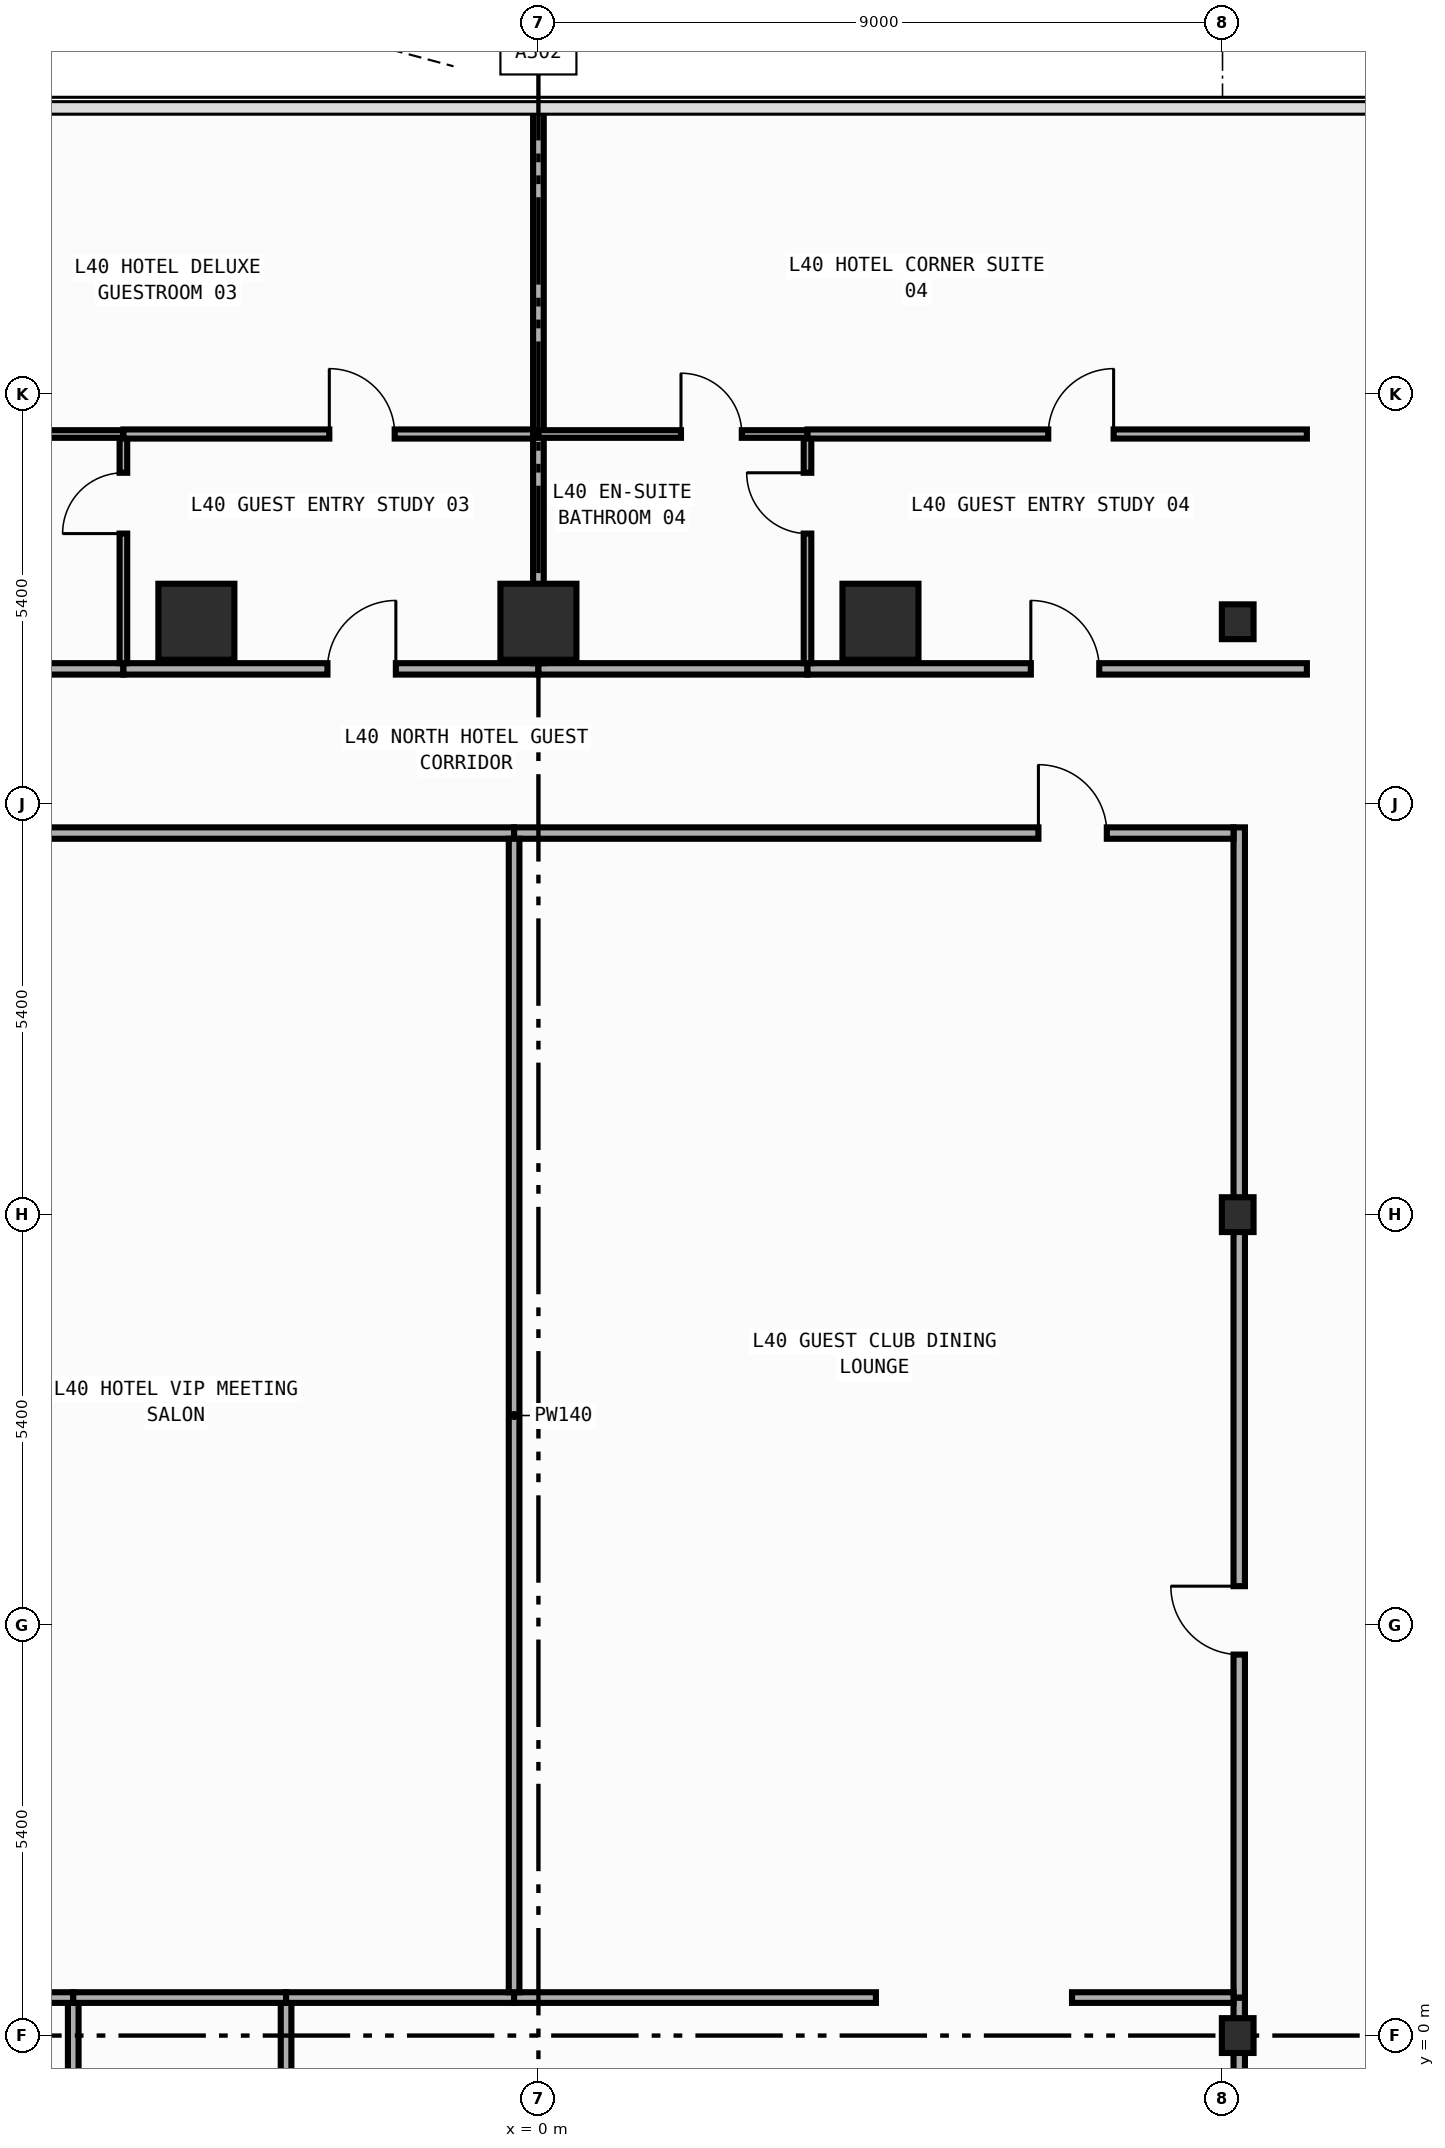
"""IFC4 building model, lengths in metres.
Left out: names, types, materials, properties, quantities, classifications, styles, units other than length and angle.
Written with IfcOpenShell. Run it as: python <this file> out.ifc"""

import sys

from ifc_helpers import new_model, si_unit, direction, frame, frame_2d, origin, origin_2d, place, context, subcontext, project, spatial, rectangle, i_section, extrude, element, fill, save


model = new_model("IFC4")
c1 = context("Model", 3, precision=1e-05, world=origin(), true_north=direction((0.0, 1.0)))
c2 = subcontext(c1, "Body", "Model", "MODEL_VIEW")
j1 = project(units=[si_unit("LENGTHUNIT", "METRE"), si_unit("PLANEANGLEUNIT", "RADIAN")], contexts=[c1])
p1 = place(None, origin())
s1 = spatial("IfcSite", under=j1, at=p1, CompositionType="ELEMENT")
p2 = place(p1, origin())
s2 = spatial("IfcBuilding", under=s1, at=p2, CompositionType="ELEMENT")
p3 = place(p2, frame((0.0, 0.0, 176.4)))
s3 = spatial("IfcBuildingStorey", under=s2, at=p3, CompositionType="ELEMENT", Elevation=176.4)
for number, where, z_axis, x_axis in (
    (1, (9.2, 0.0, 0.0), (0.0, 0.0, 1.0), (1.0, 0.0, 0.0)),
    (2, (9.2, 10.8, 0.0), (0.0, 0.0, 1.0), (1.0, 0.0, 0.0)),
    (3, (9.2, 18.6, 0.0), (0.0, 0.0, 1.0), (1.0, 0.0, 0.0)),
):
    element("IfcColumn", number, at=place(p3, frame(where, z_axis=z_axis, x_axis=x_axis)), inside=s3, PredefinedType="COLUMN", context=c2, shape_type="SweptSolid", body=[
        extrude(i_section(OverallWidth=0.417, OverallDepth=0.458, WebThickness=0.03, FlangeThickness=0.05, FilletRadius=0.022, at=origin_2d()), origin(), (0.0, 0.0, 1.0), 3.8),
    ])
for number, where, z_axis, x_axis in (
    (4, (-4.5, 18.6, 0.0), (0.0, 0.0, 1.0), (1.0, 0.0, 0.0)),
    (5, (0.0, 18.6, 0.0), (0.0, 0.0, 1.0), (1.0, 0.0, 0.0)),
    (6, (4.5, 18.6, 0.0), (0.0, 0.0, 1.0), (1.0, 0.0, 0.0)),
):
    element("IfcColumn", number, at=place(p3, frame(where, z_axis=z_axis, x_axis=x_axis)), inside=s3, PredefinedType="COLUMN", context=c2, shape_type="SweptSolid", body=[
        extrude(rectangle(XDim=1.0, YDim=1.0, at=origin_2d()), origin(), (0.0, 0.0, 1.0), 3.8),
    ])
p4 = place(p3, frame((9.22, -14.595, 0.0), z_axis=(0.0, 0.0, 1.0), x_axis=(0.0, 1.0, 0.0)))
e7 = element("IfcWall", 7, at=p4, inside=s3, PredefinedType="PARTITIONING", context=c2, shape_type="SweptSolid", body=[
    extrude(rectangle(XDim=15.095, YDim=0.15, at=frame_2d((7.547, 0.0))), origin(), (0.0, 0.0, 1.0), 2.952),
])
p5 = place(p4, frame((8.707, 0.0, 0.0)))
e8 = element("IfcOpeningElement", 8, at=p5, cuts=e7, PredefinedType="OPENING", context=c2, shape_type="SweptSolid", body=[
    extrude(rectangle(XDim=0.9, YDim=2.15, at=frame_2d((0.45, 1.075))), frame((0.0, 0.085, 0.0), z_axis=(0.0, -1.0, 0.0), x_axis=(1.0, 0.0, 0.0)), (0.0, 0.0, 1.0), 0.17),
])
p6 = place(p3, frame((9.22, 0.5, 0.0), z_axis=(0.0, 0.0, 1.0), x_axis=(0.0, 1.0, 0.0)))
e9 = element("IfcWall", 9, at=p6, inside=s3, PredefinedType="PARTITIONING", context=c2, shape_type="SweptSolid", body=[
    extrude(rectangle(XDim=15.395, YDim=0.15, at=frame_2d((7.698, 0.0))), origin(), (0.0, 0.0, 1.0), 2.952),
])
p7 = place(p6, frame((4.512, 0.0, 0.0)))
e10 = element("IfcOpeningElement", 10, at=p7, cuts=e9, PredefinedType="OPENING", context=c2, shape_type="SweptSolid", body=[
    extrude(rectangle(XDim=0.9, YDim=2.15, at=frame_2d((0.45, 1.075))), frame((0.0, 0.085, 0.0), z_axis=(0.0, -1.0, 0.0), x_axis=(1.0, 0.0, 0.0)), (0.0, 0.0, 1.0), 0.17),
])
p8 = place(p3, frame((-9.145, 15.82, 0.0), z_axis=(0.0, 0.0, 1.0), x_axis=(1.0, 0.0, 0.0)))
e11 = element("IfcWall", 11, at=p8, inside=s3, PredefinedType="PARTITIONING", context=c2, shape_type="SweptSolid", body=[
    extrude(rectangle(XDim=8.825, YDim=0.15, at=frame_2d((4.413, 0.0))), origin(), (0.0, 0.0, 1.0), 3.54),
])
p9 = place(p8, frame((1.661, 0.0, 0.0)))
e12 = element("IfcOpeningElement", 12, at=p9, cuts=e11, PredefinedType="OPENING", context=c2, shape_type="SweptSolid", body=[
    extrude(rectangle(XDim=0.9, YDim=2.15, at=frame_2d((0.45, 1.075))), frame((0.0, 0.085, 0.0), z_axis=(0.0, -1.0, 0.0), x_axis=(1.0, 0.0, 0.0)), (0.0, 0.0, 1.0), 0.17),
])
p10 = place(p3, frame((-0.32, 15.82, 0.0), z_axis=(0.0, 0.0, 1.0), x_axis=(1.0, 0.0, 0.0)))
e13 = element("IfcWall", 13, at=p10, inside=s3, PredefinedType="PARTITIONING", context=c2, shape_type="SweptSolid", body=[
    extrude(rectangle(XDim=9.465, YDim=0.15, at=frame_2d((4.732, 0.0))), origin(), (0.0, 0.0, 1.0), 3.54),
])
p11 = place(p10, frame((6.898, 0.0, 0.0)))
e14 = element("IfcOpeningElement", 14, at=p11, cuts=e13, PredefinedType="OPENING", context=c2, shape_type="SweptSolid", body=[
    extrude(rectangle(XDim=0.9, YDim=2.15, at=frame_2d((0.45, 1.075))), frame((0.0, 0.085, 0.0), z_axis=(0.0, -1.0, 0.0), x_axis=(1.0, 0.0, 0.0)), (0.0, 0.0, 1.0), 0.17),
])
p12 = place(p3, frame((-9.0, 17.98, 0.0), z_axis=(0.0, 0.0, 1.0), x_axis=(1.0, 0.0, 0.0)))
e15 = element("IfcWall", 15, at=p12, inside=s3, PredefinedType="PARTITIONING", context=c2, shape_type="SweptSolid", body=[
    extrude(rectangle(XDim=3.54, YDim=0.15, at=frame_2d((1.77, 0.0))), origin(), (0.0, 0.0, 1.0), 3.54),
])
p13 = place(p3, frame((-5.46, 17.98, 0.0), z_axis=(0.0, 0.0, 1.0), x_axis=(1.0, 0.0, 0.0)))
e16 = element("IfcWall", 16, at=p13, inside=s3, PredefinedType="PARTITIONING", context=c2, shape_type="SweptSolid", body=[
    extrude(rectangle(XDim=5.46, YDim=0.15, at=frame_2d((2.73, 0.0))), origin(), (0.0, 0.0, 1.0), 3.54),
])
p14 = place(p13, frame((2.684, 0.0, 0.0)))
e17 = element("IfcOpeningElement", 17, at=p14, cuts=e16, PredefinedType="OPENING", context=c2, shape_type="SweptSolid", body=[
    extrude(rectangle(XDim=0.9, YDim=2.15, at=frame_2d((0.45, 1.075))), frame((0.0, 0.085, 0.0), z_axis=(0.0, -1.0, 0.0), x_axis=(1.0, 0.0, 0.0)), (0.0, 0.0, 1.0), 0.17),
])
p15 = place(p3, frame((0.0, 17.98, 0.0), z_axis=(0.0, 0.0, 1.0), x_axis=(1.0, 0.0, 0.0)))
e18 = element("IfcWall", 18, at=p15, inside=s3, PredefinedType="PARTITIONING", context=c2, shape_type="SweptSolid", body=[
    extrude(rectangle(XDim=3.54, YDim=0.15, at=frame_2d((1.77, 0.0))), origin(), (0.0, 0.0, 1.0), 3.54),
])
p16 = place(p3, frame((3.54, 17.98, 0.0), z_axis=(0.0, 0.0, 1.0), x_axis=(1.0, 0.0, 0.0)))
e19 = element("IfcWall", 19, at=p16, inside=s3, PredefinedType="PARTITIONING", context=c2, shape_type="SweptSolid", body=[
    extrude(rectangle(XDim=6.57, YDim=0.15, at=frame_2d((3.285, 0.0))), origin(), (0.0, 0.0, 1.0), 3.54),
])
p17 = place(p16, frame((2.938, 0.0, 0.0)))
e20 = element("IfcOpeningElement", 20, at=p17, cuts=e19, PredefinedType="OPENING", context=c2, shape_type="SweptSolid", body=[
    extrude(rectangle(XDim=0.9, YDim=2.15, at=frame_2d((0.45, 1.075))), frame((0.0, 0.085, 0.0), z_axis=(0.0, -1.0, 0.0), x_axis=(1.0, 0.0, 0.0)), (0.0, 0.0, 1.0), 0.17),
])
p18 = place(p3, frame((-6.12, -14.445, 0.0), z_axis=(0.0, 0.0, 1.0), x_axis=(0.0, 1.0, 0.0)))
e21 = element("IfcWall", 21, at=p18, inside=s3, PredefinedType="PARTITIONING", context=c2, shape_type="SweptSolid", body=[
    extrude(rectangle(XDim=14.875, YDim=0.14, at=frame_2d((7.438, 0.0))), origin(), (0.0, 0.0, 1.0), 3.54),
])
p19 = place(p3, frame((-9.145, 0.5, 0.0), z_axis=(0.0, 0.0, 1.0), x_axis=(1.0, 0.0, 0.0)))
e22 = element("IfcWall", 22, at=p19, inside=s3, PredefinedType="PARTITIONING", context=c2, shape_type="SweptSolid", body=[
    extrude(rectangle(XDim=3.025, YDim=0.14, at=frame_2d((1.512, 0.0))), origin(), (0.0, 0.0, 1.0), 3.54),
])
p20 = place(p3, frame((-3.32, -14.445, 0.0), z_axis=(0.0, 0.0, 1.0), x_axis=(0.0, 1.0, 0.0)))
e23 = element("IfcWall", 23, at=p20, inside=s3, PredefinedType="PARTITIONING", context=c2, shape_type="SweptSolid", body=[
    extrude(rectangle(XDim=14.875, YDim=0.14, at=frame_2d((7.438, 0.0))), origin(), (0.0, 0.0, 1.0), 3.54),
])
p21 = place(p3, frame((-6.12, 0.5, 0.0), z_axis=(0.0, 0.0, 1.0), x_axis=(1.0, 0.0, 0.0)))
e24 = element("IfcWall", 24, at=p21, inside=s3, PredefinedType="PARTITIONING", context=c2, shape_type="SweptSolid", body=[
    extrude(rectangle(XDim=2.8, YDim=0.14, at=frame_2d((1.4, 0.0))), origin(), (0.0, 0.0, 1.0), 3.54),
])
p22 = place(p3, frame((-3.32, 0.5, 0.0), z_axis=(0.0, 0.0, 1.0), x_axis=(1.0, 0.0, 0.0)))
e25 = element("IfcWall", 25, at=p22, inside=s3, PredefinedType="PARTITIONING", context=c2, shape_type="SweptSolid", body=[
    extrude(rectangle(XDim=3.0, YDim=0.14, at=frame_2d((1.5, 0.0))), origin(), (0.0, 0.0, 1.0), 3.54),
])
p23 = place(p3, frame((-0.32, 0.5, 0.0), z_axis=(0.0, 0.0, 1.0), x_axis=(1.0, 0.0, 0.0)))
e26 = element("IfcWall", 26, at=p23, inside=s3, PredefinedType="PARTITIONING", context=c2, shape_type="SweptSolid", body=[
    extrude(rectangle(XDim=4.76, YDim=0.14, at=frame_2d((2.38, 0.0))), origin(), (0.0, 0.0, 1.0), 3.54),
])
p24 = place(p3, frame((7.02, 0.5, 0.0), z_axis=(0.0, 0.0, 1.0), x_axis=(1.0, 0.0, 0.0)))
e27 = element("IfcWall", 27, at=p24, inside=s3, PredefinedType="PARTITIONING", context=c2, shape_type="SweptSolid", body=[
    extrude(rectangle(XDim=2.125, YDim=0.14, at=frame_2d((1.062, 0.0))), origin(), (0.0, 0.0, 1.0), 3.54),
])
p25 = place(p3, frame((-0.32, 0.57, 0.0), z_axis=(0.0, 0.0, 1.0), x_axis=(0.0, 1.0, 0.0)))
e28 = element("IfcWall", 28, at=p25, inside=s3, PredefinedType="PARTITIONING", context=c2, shape_type="SweptSolid", body=[
    extrude(rectangle(XDim=15.175, YDim=0.14, at=frame_2d((7.587, 0.0))), origin(), (0.0, 0.0, 1.0), 3.54),
])
p26 = place(p3, frame((-5.46, 18.055, 0.0), z_axis=(0.0, 0.0, 1.0), x_axis=(0.0, 1.0, 0.0)))
e29 = element("IfcWall", 29, at=p26, inside=s3, PredefinedType="PARTITIONING", context=c2, shape_type="SweptSolid", body=[
    extrude(rectangle(XDim=2.965, YDim=0.1, at=frame_2d((1.482, 0.0))), origin(), (0.0, 0.0, 1.0), 3.54),
])
p27 = place(p26, frame((1.705, 0.0, 0.0)))
e30 = element("IfcOpeningElement", 30, at=p27, cuts=e29, PredefinedType="OPENING", context=c2, shape_type="SweptSolid", body=[
    extrude(rectangle(XDim=0.8, YDim=2.1, at=frame_2d((0.4, 1.05))), frame((0.0, 0.06, 0.0), z_axis=(0.0, -1.0, 0.0), x_axis=(1.0, 0.0, 0.0)), (0.0, 0.0, 1.0), 0.12),
])
p28 = place(p3, frame((-9.0, 21.07, 0.0), z_axis=(0.0, 0.0, 1.0), x_axis=(1.0, 0.0, 0.0)))
e31 = element("IfcWall", 31, at=p28, inside=s3, PredefinedType="PARTITIONING", context=c2, shape_type="SweptSolid", body=[
    extrude(rectangle(XDim=3.54, YDim=0.1, at=frame_2d((1.77, 0.0))), origin(), (0.0, 0.0, 1.0), 3.54),
])
p29 = place(p28, frame((1.471, 0.0, 0.0)))
e32 = element("IfcOpeningElement", 32, at=p29, cuts=e31, PredefinedType="OPENING", context=c2, shape_type="SweptSolid", body=[
    extrude(rectangle(XDim=0.8, YDim=2.1, at=frame_2d((0.4, 1.05))), frame((0.0, 0.06, 0.0), z_axis=(0.0, -1.0, 0.0), x_axis=(1.0, 0.0, 0.0)), (0.0, 0.0, 1.0), 0.12),
])
p30 = place(p3, frame((-5.46, 21.07, 0.0), z_axis=(0.0, 0.0, 1.0), x_axis=(1.0, 0.0, 0.0)))
e33 = element("IfcWall", 33, at=p30, inside=s3, PredefinedType="PARTITIONING", context=c2, shape_type="SweptSolid", body=[
    extrude(rectangle(XDim=5.46, YDim=0.12, at=frame_2d((2.73, 0.0))), origin(), (0.0, 0.0, 1.0), 3.54),
])
p31 = place(p30, frame((2.709, 0.0, 0.0)))
e34 = element("IfcOpeningElement", 34, at=p31, cuts=e33, PredefinedType="OPENING", context=c2, shape_type="SweptSolid", body=[
    extrude(rectangle(XDim=0.86, YDim=2.15, at=frame_2d((0.43, 1.075))), frame((0.0, 0.07, 0.0), z_axis=(0.0, -1.0, 0.0), x_axis=(1.0, 0.0, 0.0)), (0.0, 0.0, 1.0), 0.14),
])
p32 = place(p3, frame((0.0, 18.055, 0.0), z_axis=(0.0, 0.0, 1.0), x_axis=(0.0, 1.0, 0.0)))
e35 = element("IfcWall", 35, at=p32, inside=s3, PredefinedType="PARTITIONING", context=c2, shape_type="SweptSolid", body=[
    extrude(rectangle(XDim=3.015, YDim=0.14, at=frame_2d((1.508, 0.0))), origin(), (0.0, 0.0, 1.0), 3.54),
])
p33 = place(p3, frame((0.0, 21.07, 0.0), z_axis=(0.0, 0.0, 1.0), x_axis=(0.0, 1.0, 0.0)))
e36 = element("IfcWall", 36, at=p33, inside=s3, PredefinedType="PARTITIONING", context=c2, shape_type="SweptSolid", body=[
    extrude(rectangle(XDim=4.285, YDim=0.14, at=frame_2d((2.143, 0.0))), origin(), (0.0, 0.0, 1.0), 3.54),
])
p34 = place(p3, frame((3.54, 18.055, 0.0), z_axis=(0.0, 0.0, 1.0), x_axis=(0.0, 1.0, 0.0)))
e37 = element("IfcWall", 37, at=p34, inside=s3, PredefinedType="PARTITIONING", context=c2, shape_type="SweptSolid", body=[
    extrude(rectangle(XDim=2.965, YDim=0.1, at=frame_2d((1.482, 0.0))), origin(), (0.0, 0.0, 1.0), 3.54),
])
p35 = place(p34, frame((1.705, 0.0, 0.0)))
e38 = element("IfcOpeningElement", 38, at=p35, cuts=e37, PredefinedType="OPENING", context=c2, shape_type="SweptSolid", body=[
    extrude(rectangle(XDim=0.8, YDim=2.1, at=frame_2d((0.4, 1.05))), frame((0.0, 0.06, 0.0), z_axis=(0.0, -1.0, 0.0), x_axis=(1.0, 0.0, 0.0)), (0.0, 0.0, 1.0), 0.12),
])
p36 = place(p3, frame((0.0, 21.07, 0.0), z_axis=(0.0, 0.0, 1.0), x_axis=(1.0, 0.0, 0.0)))
e39 = element("IfcWall", 39, at=p36, inside=s3, PredefinedType="PARTITIONING", context=c2, shape_type="SweptSolid", body=[
    extrude(rectangle(XDim=3.54, YDim=0.1, at=frame_2d((1.77, 0.0))), origin(), (0.0, 0.0, 1.0), 3.54),
])
p37 = place(p36, frame((1.875, 0.0, 0.0)))
e40 = element("IfcOpeningElement", 40, at=p37, cuts=e39, PredefinedType="OPENING", context=c2, shape_type="SweptSolid", body=[
    extrude(rectangle(XDim=0.8, YDim=2.1, at=frame_2d((0.4, 1.05))), frame((0.0, 0.06, 0.0), z_axis=(0.0, -1.0, 0.0), x_axis=(1.0, 0.0, 0.0)), (0.0, 0.0, 1.0), 0.12),
])
p38 = place(p3, frame((3.54, 21.07, 0.0), z_axis=(0.0, 0.0, 1.0), x_axis=(1.0, 0.0, 0.0)))
e41 = element("IfcWall", 41, at=p38, inside=s3, PredefinedType="PARTITIONING", context=c2, shape_type="SweptSolid", body=[
    extrude(rectangle(XDim=6.57, YDim=0.12, at=frame_2d((3.285, 0.0))), origin(), (0.0, 0.0, 1.0), 3.54),
])
p39 = place(p38, frame((3.167, 0.0, 0.0)))
e42 = element("IfcOpeningElement", 42, at=p39, cuts=e41, PredefinedType="OPENING", context=c2, shape_type="SweptSolid", body=[
    extrude(rectangle(XDim=0.86, YDim=2.15, at=frame_2d((0.43, 1.075))), frame((0.0, 0.07, 0.0), z_axis=(0.0, -1.0, 0.0), x_axis=(1.0, 0.0, 0.0)), (0.0, 0.0, 1.0), 0.14),
])
p40 = place(p7, origin())
e43 = element("IfcDoor", 43, at=p40, inside=s3, OperationType="SINGLE_SWING_RIGHT", PredefinedType="DOOR", context=c2, shape_type="SweptSolid", body=[
    extrude(rectangle(XDim=0.9, YDim=2.15, at=frame_2d((0.45, 1.075))), frame((0.0, 0.025, 0.0), z_axis=(0.0, -1.0, 0.0), x_axis=(1.0, 0.0, 0.0)), (0.0, 0.0, 1.0), 0.05),
])
fill(e10, e43)
p41 = place(p11, origin())
e44 = element("IfcDoor", 44, at=p41, inside=s3, OperationType="SINGLE_SWING_LEFT", PredefinedType="DOOR", context=c2, shape_type="SweptSolid", body=[
    extrude(rectangle(XDim=0.9, YDim=2.15, at=frame_2d((0.45, 1.075))), frame((0.0, 0.025, 0.0), z_axis=(0.0, -1.0, 0.0), x_axis=(1.0, 0.0, 0.0)), (0.0, 0.0, 1.0), 0.05),
])
fill(e14, e44)
p42 = place(p14, origin())
e45 = element("IfcDoor", 45, at=p42, inside=s3, OperationType="SINGLE_SWING_RIGHT", PredefinedType="DOOR", context=c2, shape_type="SweptSolid", body=[
    extrude(rectangle(XDim=0.9, YDim=2.15, at=frame_2d((0.45, 1.075))), frame((0.0, 0.025, 0.0), z_axis=(0.0, -1.0, 0.0), x_axis=(1.0, 0.0, 0.0)), (0.0, 0.0, 1.0), 0.05),
])
fill(e17, e45)
p43 = place(p17, origin())
e46 = element("IfcDoor", 46, at=p43, inside=s3, OperationType="SINGLE_SWING_LEFT", PredefinedType="DOOR", context=c2, shape_type="SweptSolid", body=[
    extrude(rectangle(XDim=0.9, YDim=2.15, at=frame_2d((0.45, 1.075))), frame((0.0, 0.025, 0.0), z_axis=(0.0, -1.0, 0.0), x_axis=(1.0, 0.0, 0.0)), (0.0, 0.0, 1.0), 0.05),
])
fill(e20, e46)
p44 = place(p27, origin())
e47 = element("IfcDoor", 47, at=p44, inside=s3, OperationType="SINGLE_SWING_LEFT", PredefinedType="DOOR", context=c2, shape_type="SweptSolid", body=[
    extrude(rectangle(XDim=0.8, YDim=2.1, at=frame_2d((0.4, 1.05))), frame((0.0, 0.025, 0.0), z_axis=(0.0, -1.0, 0.0), x_axis=(1.0, 0.0, 0.0)), (0.0, 0.0, 1.0), 0.05),
])
fill(e30, e47)
p45 = place(p31, origin())
e48 = element("IfcDoor", 48, at=p45, inside=s3, OperationType="SINGLE_SWING_LEFT", PredefinedType="DOOR", context=c2, shape_type="SweptSolid", body=[
    extrude(rectangle(XDim=0.86, YDim=2.15, at=frame_2d((0.43, 1.075))), frame((0.0, 0.025, 0.0), z_axis=(0.0, -1.0, 0.0), x_axis=(1.0, 0.0, 0.0)), (0.0, 0.0, 1.0), 0.05),
])
fill(e34, e48)
p46 = place(p35, origin())
e49 = element("IfcDoor", 49, at=p46, inside=s3, OperationType="SINGLE_SWING_RIGHT", PredefinedType="DOOR", context=c2, shape_type="SweptSolid", body=[
    extrude(rectangle(XDim=0.8, YDim=2.1, at=frame_2d((0.4, 1.05))), frame((0.0, 0.025, 0.0), z_axis=(0.0, -1.0, 0.0), x_axis=(1.0, 0.0, 0.0)), (0.0, 0.0, 1.0), 0.05),
])
fill(e38, e49)
p47 = place(p37, origin())
e50 = element("IfcDoor", 50, at=p47, inside=s3, OperationType="SINGLE_SWING_LEFT", PredefinedType="DOOR", context=c2, shape_type="SweptSolid", body=[
    extrude(rectangle(XDim=0.8, YDim=2.1, at=frame_2d((0.4, 1.05))), frame((0.0, 0.025, 0.0), z_axis=(0.0, -1.0, 0.0), x_axis=(1.0, 0.0, 0.0)), (0.0, 0.0, 1.0), 0.05),
])
fill(e40, e50)
p48 = place(p39, origin())
e51 = element("IfcDoor", 51, at=p48, inside=s3, OperationType="SINGLE_SWING_RIGHT", PredefinedType="DOOR", context=c2, shape_type="SweptSolid", body=[
    extrude(rectangle(XDim=0.86, YDim=2.15, at=frame_2d((0.43, 1.075))), frame((0.0, 0.025, 0.0), z_axis=(0.0, -1.0, 0.0), x_axis=(1.0, 0.0, 0.0)), (0.0, 0.0, 1.0), 0.05),
])
fill(e42, e51)
save(model, sys.argv[1])
